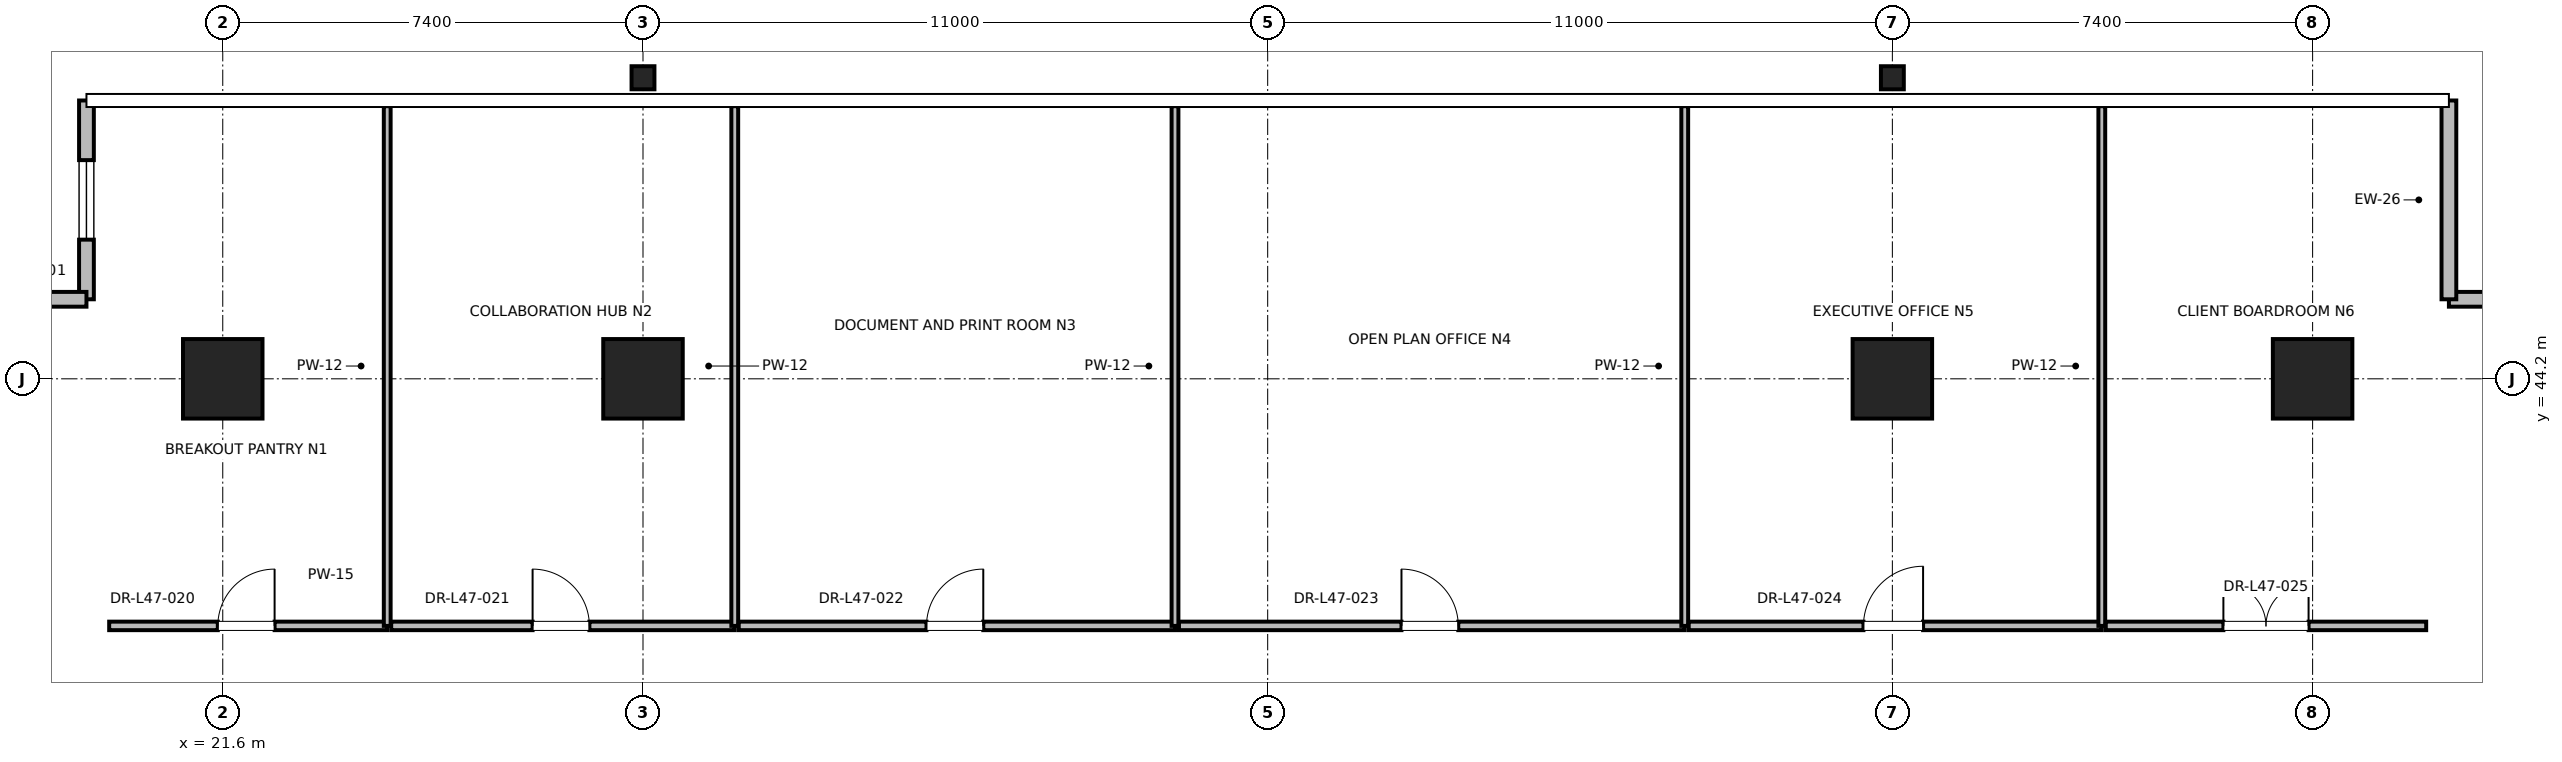
"""IFC4 building model, lengths in metres.
Left out: names, types, materials, properties, quantities, classifications, styles, units other than length and angle.
Written with IfcOpenShell. Run it as: python <this file> out.ifc"""

import sys

from ifc_helpers import new_model, si_unit, direction, frame, frame_2d, origin, origin_2d, place, context, subcontext, project, spatial, rectangle, i_section, extrude, element, fill, save


model = new_model("IFC4")
c1 = context("Model", 3, precision=1e-05, world=origin(), true_north=direction((0.0, 1.0)))
c2 = subcontext(c1, "Body", "Model", "MODEL_VIEW")
j1 = project(units=[si_unit("LENGTHUNIT", "METRE"), si_unit("PLANEANGLEUNIT", "RADIAN")], contexts=[c1])
p1 = place(None, origin())
s1 = spatial("IfcSite", under=j1, at=p1, CompositionType="ELEMENT")
p2 = place(p1, origin())
s2 = spatial("IfcBuilding", under=s1, at=p2, CompositionType="ELEMENT")
p3 = place(p2, frame((0.0, 0.0, 205.2)))
s3 = spatial("IfcBuildingStorey", under=s2, at=p3, CompositionType="ELEMENT", Elevation=205.2)
for number, where, z_axis, x_axis in (
    (1, (29.0, 44.2, 0.0), (0.0, 0.0, 1.0), (1.0, 0.0, 0.0)),
    (2, (51.0, 44.2, 0.0), (0.0, 0.0, 1.0), (1.0, 0.0, 0.0)),
    (3, (21.6, 44.2, 0.0), (0.0, 0.0, 1.0), (1.0, 0.0, 0.0)),
    (4, (58.4, 44.2, 0.0), (0.0, 0.0, 1.0), (1.0, 0.0, 0.0)),
):
    element("IfcColumn", number, at=place(p3, frame(where, z_axis=z_axis, x_axis=x_axis)), inside=s3, PredefinedType="COLUMN", context=c2, shape_type="SweptSolid", body=[
        extrude(rectangle(XDim=1.4, YDim=1.4, at=origin_2d()), origin(), (0.0, 0.0, 1.0), 4.0),
    ])
for number, where, z_axis, x_axis in (
    (5, (29.0, 49.5, 0.0), (0.0, 0.0, 1.0), (1.0, 0.0, 0.0)),
    (6, (51.0, 49.5, 0.0), (0.0, 0.0, 1.0), (1.0, 0.0, 0.0)),
):
    element("IfcColumn", number, at=place(p3, frame(where, z_axis=z_axis, x_axis=x_axis)), inside=s3, PredefinedType="COLUMN", context=c2, shape_type="SweptSolid", body=[
        extrude(i_section(OverallWidth=0.403, OverallDepth=0.406, WebThickness=0.027, FlangeThickness=0.043, FilletRadius=0.015, at=origin_2d()), origin(), (0.0, 0.0, 1.0), 4.0),
    ])
p4 = place(p3, frame((64.8, 45.6, 0.0), z_axis=(0.0, 0.0, 1.0), x_axis=(-1.0, 0.0, 0.0)))
e7 = element("IfcWall", 7, at=p4, inside=s3, PredefinedType="PARAPET", context=c2, shape_type="SweptSolid", body=[
    extrude(rectangle(XDim=4.0, YDim=0.26, at=frame_2d((2.0, 0.0))), origin(), (0.0, 0.0, 1.0), 3.775),
])
p5 = place(p4, frame((1.3, 0.0, 0.85)))
e8 = element("IfcOpeningElement", 8, at=p5, cuts=e7, PredefinedType="OPENING", context=c2, shape_type="SweptSolid", body=[
    extrude(rectangle(XDim=1.4, YDim=2.0, at=frame_2d((0.7, 1.0))), frame((0.0, 0.13, 0.0), z_axis=(0.0, -1.0, 0.0), x_axis=(1.0, 0.0, 0.0)), (0.0, 0.0, 1.0), 0.26),
])
p6 = place(p3, frame((60.8, 45.6, 0.0), z_axis=(0.0, 0.0, 1.0), x_axis=(0.0, 1.0, 0.0)))
e9 = element("IfcWall", 9, at=p6, inside=s3, PredefinedType="PARAPET", context=c2, shape_type="SweptSolid", body=[
    extrude(rectangle(XDim=3.5, YDim=0.26, at=frame_2d((1.75, 0.0))), origin(), (0.0, 0.0, 1.0), 3.775),
])
p7 = place(p3, frame((19.2, 49.1, 0.0), z_axis=(0.0, 0.0, 1.0), x_axis=(0.0, -1.0, 0.0)))
e10 = element("IfcWall", 10, at=p7, inside=s3, PredefinedType="PARAPET", context=c2, shape_type="SweptSolid", body=[
    extrude(rectangle(XDim=3.5, YDim=0.26, at=frame_2d((1.75, 0.0))), origin(), (0.0, 0.0, 1.0), 3.775),
])
p8 = place(p7, frame((1.05, 0.0, 0.85)))
e11 = element("IfcOpeningElement", 11, at=p8, cuts=e10, PredefinedType="OPENING", context=c2, shape_type="SweptSolid", body=[
    extrude(rectangle(XDim=1.4, YDim=2.0, at=frame_2d((0.7, 1.0))), frame((0.0, 0.13, 0.0), z_axis=(0.0, -1.0, 0.0), x_axis=(1.0, 0.0, 0.0)), (0.0, 0.0, 1.0), 0.26),
])
p9 = place(p3, frame((19.2, 45.6, 0.0), z_axis=(0.0, 0.0, 1.0), x_axis=(-1.0, 0.0, 0.0)))
e12 = element("IfcWall", 12, at=p9, inside=s3, PredefinedType="PARAPET", context=c2, shape_type="SweptSolid", body=[
    extrude(rectangle(XDim=4.0, YDim=0.26, at=frame_2d((2.0, 0.0))), origin(), (0.0, 0.0, 1.0), 3.775),
])
p10 = place(p3, frame((19.6, 39.85, 0.0), z_axis=(0.0, 0.0, 1.0), x_axis=(1.0, 0.0, 0.0)))
e13 = element("IfcWall", 13, at=p10, inside=s3, PredefinedType="PARTITIONING", context=c2, shape_type="SweptSolid", body=[
    extrude(rectangle(XDim=4.896, YDim=0.15, at=frame_2d((2.448, 0.0))), origin(), (0.0, 0.0, 1.0), 2.85),
])
p11 = place(p10, frame((1.913, 0.0, 0.0)))
e14 = element("IfcOpeningElement", 14, at=p11, cuts=e13, PredefinedType="OPENING", context=c2, shape_type="SweptSolid", body=[
    extrude(rectangle(XDim=1.0, YDim=2.15, at=frame_2d((0.5, 1.075))), frame((0.0, 0.075, 0.0), z_axis=(0.0, -1.0, 0.0), x_axis=(1.0, 0.0, 0.0)), (0.0, 0.0, 1.0), 0.15),
])
p12 = place(p3, frame((24.496, 39.85, 0.0), z_axis=(0.0, 0.0, 1.0), x_axis=(0.0, 1.0, 0.0)))
e15 = element("IfcWall", 15, at=p12, inside=s3, PredefinedType="PARTITIONING", context=c2, shape_type="SweptSolid", body=[
    extrude(rectangle(XDim=9.15, YDim=0.12, at=frame_2d((4.575, 0.0))), origin(), (0.0, 0.0, 1.0), 2.85),
])
p13 = place(p3, frame((24.566, 39.85, 0.0), z_axis=(0.0, 0.0, 1.0), x_axis=(1.0, 0.0, 0.0)))
e16 = element("IfcWall", 16, at=p13, inside=s3, PredefinedType="PARTITIONING", context=c2, shape_type="SweptSolid", body=[
    extrude(rectangle(XDim=6.05, YDim=0.15, at=frame_2d((3.025, 0.0))), origin(), (0.0, 0.0, 1.0), 2.85),
])
p14 = place(p13, frame((2.49, 0.0, 0.0)))
e17 = element("IfcOpeningElement", 17, at=p14, cuts=e16, PredefinedType="OPENING", context=c2, shape_type="SweptSolid", body=[
    extrude(rectangle(XDim=1.0, YDim=2.15, at=frame_2d((0.5, 1.075))), frame((0.0, 0.075, 0.0), z_axis=(0.0, -1.0, 0.0), x_axis=(1.0, 0.0, 0.0)), (0.0, 0.0, 1.0), 0.15),
])
p15 = place(p3, frame((30.616, 39.85, 0.0), z_axis=(0.0, 0.0, 1.0), x_axis=(0.0, 1.0, 0.0)))
e18 = element("IfcWall", 18, at=p15, inside=s3, PredefinedType="PARTITIONING", context=c2, shape_type="SweptSolid", body=[
    extrude(rectangle(XDim=9.15, YDim=0.12, at=frame_2d((4.575, 0.0))), origin(), (0.0, 0.0, 1.0), 2.405),
])
p16 = place(p3, frame((30.686, 39.85, 0.0), z_axis=(0.0, 0.0, 1.0), x_axis=(1.0, 0.0, 0.0)))
e19 = element("IfcWall", 19, at=p16, inside=s3, PredefinedType="PARTITIONING", context=c2, shape_type="SweptSolid", body=[
    extrude(rectangle(XDim=7.682, YDim=0.15, at=frame_2d((3.841, 0.0))), origin(), (0.0, 0.0, 1.0), 2.85),
])
p17 = place(p16, frame((3.306, 0.0, 0.0)))
e20 = element("IfcOpeningElement", 20, at=p17, cuts=e19, PredefinedType="OPENING", context=c2, shape_type="SweptSolid", body=[
    extrude(rectangle(XDim=1.0, YDim=2.15, at=frame_2d((0.5, 1.075))), frame((0.0, 0.075, 0.0), z_axis=(0.0, -1.0, 0.0), x_axis=(1.0, 0.0, 0.0)), (0.0, 0.0, 1.0), 0.15),
])
p18 = place(p3, frame((38.368, 39.85, 0.0), z_axis=(0.0, 0.0, 1.0), x_axis=(0.0, 1.0, 0.0)))
e21 = element("IfcWall", 21, at=p18, inside=s3, PredefinedType="PARTITIONING", context=c2, shape_type="SweptSolid", body=[
    extrude(rectangle(XDim=9.15, YDim=0.12, at=frame_2d((4.575, 0.0))), origin(), (0.0, 0.0, 1.0), 2.405),
])
p19 = place(p3, frame((38.438, 39.85, 0.0), z_axis=(0.0, 0.0, 1.0), x_axis=(1.0, 0.0, 0.0)))
e22 = element("IfcWall", 22, at=p19, inside=s3, PredefinedType="PARTITIONING", context=c2, shape_type="SweptSolid", body=[
    extrude(rectangle(XDim=8.906, YDim=0.15, at=frame_2d((4.453, 0.0))), origin(), (0.0, 0.0, 1.0), 2.85),
])
p20 = place(p19, frame((3.918, 0.0, 0.0)))
e23 = element("IfcOpeningElement", 23, at=p20, cuts=e22, PredefinedType="OPENING", context=c2, shape_type="SweptSolid", body=[
    extrude(rectangle(XDim=1.0, YDim=2.15, at=frame_2d((0.5, 1.075))), frame((0.0, 0.075, 0.0), z_axis=(0.0, -1.0, 0.0), x_axis=(1.0, 0.0, 0.0)), (0.0, 0.0, 1.0), 0.15),
])
p21 = place(p3, frame((47.344, 39.85, 0.0), z_axis=(0.0, 0.0, 1.0), x_axis=(0.0, 1.0, 0.0)))
e24 = element("IfcWall", 24, at=p21, inside=s3, PredefinedType="PARTITIONING", context=c2, shape_type="SweptSolid", body=[
    extrude(rectangle(XDim=9.15, YDim=0.12, at=frame_2d((4.575, 0.0))), origin(), (0.0, 0.0, 1.0), 2.405),
])
p22 = place(p3, frame((47.414, 39.85, 0.0), z_axis=(0.0, 0.0, 1.0), x_axis=(1.0, 0.0, 0.0)))
e25 = element("IfcWall", 25, at=p22, inside=s3, PredefinedType="PARTITIONING", context=c2, shape_type="SweptSolid", body=[
    extrude(rectangle(XDim=7.274, YDim=0.15, at=frame_2d((3.637, 0.0))), origin(), (0.0, 0.0, 1.0), 2.85),
])
p23 = place(p22, frame((3.077, 0.0, 0.0)))
e26 = element("IfcOpeningElement", 26, at=p23, cuts=e25, PredefinedType="OPENING", context=c2, shape_type="SweptSolid", body=[
    extrude(rectangle(XDim=1.05, YDim=2.2, at=frame_2d((0.525, 1.1))), frame((0.0, 0.075, 0.0), z_axis=(0.0, -1.0, 0.0), x_axis=(1.0, 0.0, 0.0)), (0.0, 0.0, 1.0), 0.15),
])
p24 = place(p3, frame((54.688, 39.85, 0.0), z_axis=(0.0, 0.0, 1.0), x_axis=(0.0, 1.0, 0.0)))
e27 = element("IfcWall", 27, at=p24, inside=s3, PredefinedType="PARTITIONING", context=c2, shape_type="SweptSolid", body=[
    extrude(rectangle(XDim=9.15, YDim=0.12, at=frame_2d((4.575, 0.0))), origin(), (0.0, 0.0, 1.0), 2.85),
])
p25 = place(p3, frame((54.758, 39.85, 0.0), z_axis=(0.0, 0.0, 1.0), x_axis=(1.0, 0.0, 0.0)))
e28 = element("IfcWall", 28, at=p25, inside=s3, PredefinedType="PARTITIONING", context=c2, shape_type="SweptSolid", body=[
    extrude(rectangle(XDim=5.642, YDim=0.15, at=frame_2d((2.821, 0.0))), origin(), (0.0, 0.0, 1.0), 2.85),
])
p26 = place(p25, frame((2.071, 0.0, 0.0)))
e29 = element("IfcOpeningElement", 29, at=p26, cuts=e28, PredefinedType="OPENING", context=c2, shape_type="SweptSolid", body=[
    extrude(rectangle(XDim=1.5, YDim=2.25, at=frame_2d((0.75, 1.125))), frame((0.0, 0.075, 0.0), z_axis=(0.0, -1.0, 0.0), x_axis=(1.0, 0.0, 0.0)), (0.0, 0.0, 1.0), 0.15),
])
p27 = place(p8, origin())
e30 = element("IfcWindow", 30, at=p27, inside=s3, PartitioningType="SINGLE_PANEL", PredefinedType="WINDOW", context=c2, shape_type="SweptSolid", body=[
    extrude(rectangle(XDim=1.4, YDim=2.0, at=frame_2d((0.7, 1.0))), frame((0.0, 0.03, 0.0), z_axis=(0.0, -1.0, 0.0), x_axis=(1.0, 0.0, 0.0)), (0.0, 0.0, 1.0), 0.06),
])
fill(e11, e30)
p28 = place(p11, origin())
e31 = element("IfcDoor", 31, at=p28, inside=s3, OperationType="SINGLE_SWING_RIGHT", PredefinedType="DOOR", context=c2, shape_type="SweptSolid", body=[
    extrude(rectangle(XDim=1.0, YDim=2.15, at=frame_2d((0.5, 1.075))), frame((0.0, 0.025, 0.0), z_axis=(0.0, -1.0, 0.0), x_axis=(1.0, 0.0, 0.0)), (0.0, 0.0, 1.0), 0.05),
])
fill(e14, e31)
p29 = place(p14, origin())
e32 = element("IfcDoor", 32, at=p29, inside=s3, OperationType="SINGLE_SWING_LEFT", PredefinedType="DOOR", context=c2, shape_type="SweptSolid", body=[
    extrude(rectangle(XDim=1.0, YDim=2.15, at=frame_2d((0.5, 1.075))), frame((0.0, 0.025, 0.0), z_axis=(0.0, -1.0, 0.0), x_axis=(1.0, 0.0, 0.0)), (0.0, 0.0, 1.0), 0.05),
])
fill(e17, e32)
p30 = place(p17, origin())
e33 = element("IfcDoor", 33, at=p30, inside=s3, OperationType="SINGLE_SWING_RIGHT", PredefinedType="DOOR", context=c2, shape_type="SweptSolid", body=[
    extrude(rectangle(XDim=1.0, YDim=2.15, at=frame_2d((0.5, 1.075))), frame((0.0, 0.025, 0.0), z_axis=(0.0, -1.0, 0.0), x_axis=(1.0, 0.0, 0.0)), (0.0, 0.0, 1.0), 0.05),
])
fill(e20, e33)
p31 = place(p20, origin())
e34 = element("IfcDoor", 34, at=p31, inside=s3, OperationType="SINGLE_SWING_LEFT", PredefinedType="DOOR", context=c2, shape_type="SweptSolid", body=[
    extrude(rectangle(XDim=1.0, YDim=2.15, at=frame_2d((0.5, 1.075))), frame((0.0, 0.025, 0.0), z_axis=(0.0, -1.0, 0.0), x_axis=(1.0, 0.0, 0.0)), (0.0, 0.0, 1.0), 0.05),
])
fill(e23, e34)
p32 = place(p23, origin())
e35 = element("IfcDoor", 35, at=p32, inside=s3, OperationType="SINGLE_SWING_RIGHT", PredefinedType="DOOR", context=c2, shape_type="SweptSolid", body=[
    extrude(rectangle(XDim=1.05, YDim=2.2, at=frame_2d((0.525, 1.1))), frame((0.0, 0.025, 0.0), z_axis=(0.0, -1.0, 0.0), x_axis=(1.0, 0.0, 0.0)), (0.0, 0.0, 1.0), 0.05),
])
fill(e26, e35)
p33 = place(p26, origin())
e36 = element("IfcDoor", 36, at=p33, inside=s3, OperationType="DOUBLE_DOOR_SINGLE_SWING", PredefinedType="DOOR", context=c2, shape_type="SweptSolid", body=[
    extrude(rectangle(XDim=1.5, YDim=2.25, at=frame_2d((0.75, 1.125))), frame((0.0, 0.025, 0.0), z_axis=(0.0, -1.0, 0.0), x_axis=(1.0, 0.0, 0.0)), (0.0, 0.0, 1.0), 0.05),
])
fill(e29, e36)
save(model, sys.argv[1])
